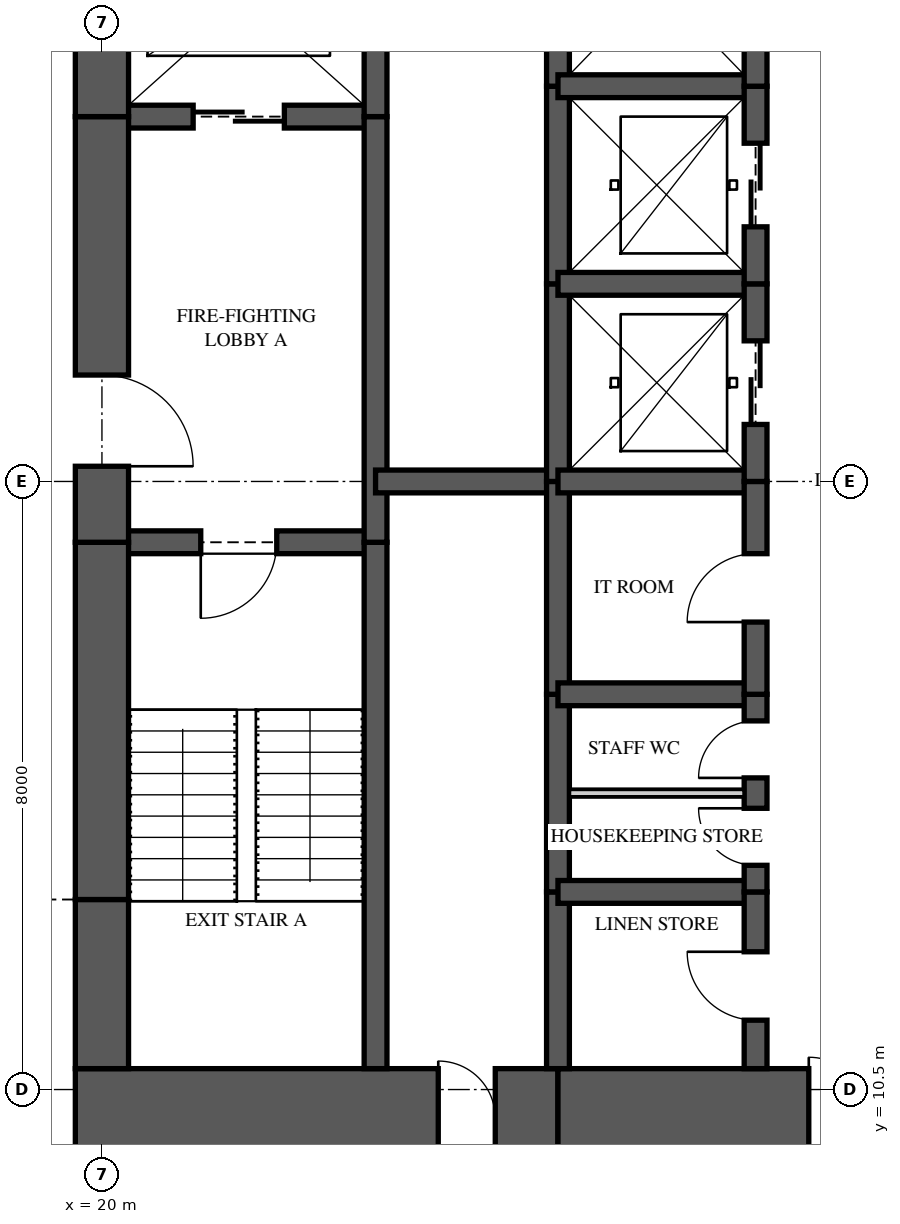
"""IFC4 building model, lengths in metres.
Left out: names, types, materials, properties, quantities, classifications, styles, units other than length and angle.
Written with IfcOpenShell. Run it as: python <this file> out.ifc"""

import sys

from ifc_helpers import new_model, si_unit, direction, frame, frame_2d, origin, place, context, subcontext, project, spatial, rectangle, extrude, element, fill, save


model = new_model("IFC4")
c1 = context("Model", 3, precision=1e-05, world=origin(), true_north=direction((0.0, 1.0)))
c2 = subcontext(c1, "Body", "Model", "MODEL_VIEW")
j1 = project(units=[si_unit("LENGTHUNIT", "METRE"), si_unit("PLANEANGLEUNIT", "RADIAN")], contexts=[c1])
p1 = place(None, origin())
s1 = spatial("IfcSite", under=j1, at=p1, CompositionType="ELEMENT")
p2 = place(p1, origin())
s2 = spatial("IfcBuilding", under=s1, at=p2, CompositionType="ELEMENT")
p3 = place(p2, frame((0.0, 0.0, 161.05)))
s3 = spatial("IfcBuildingStorey", under=s2, at=p3, CompositionType="ELEMENT", Elevation=161.05)
p4 = place(p3, frame((19.65, 10.125, 0.0), z_axis=(0.0, 0.0, 1.0), x_axis=(1.0, 0.0, 0.0)))
e1 = element("IfcWall", 1, at=p4, inside=s3, PredefinedType="SHEAR", context=c2, shape_type="SweptSolid", body=[
    extrude(rectangle(XDim=6.35, YDim=1.3, at=frame_2d((3.175, 0.0))), origin(), (0.0, 0.0, 1.0), 3.35),
])
p5 = place(p4, frame((4.775, 0.0, 0.0)))
e2 = element("IfcOpeningElement", 2, at=p5, cuts=e1, PredefinedType="OPENING", context=c2, shape_type="SweptSolid", body=[
    extrude(rectangle(XDim=0.75, YDim=2.1, at=frame_2d((0.375, 1.05))), frame((0.0, 0.66, 0.0), z_axis=(0.0, -1.0, 0.0), x_axis=(1.0, 0.0, 0.0)), (0.0, 0.0, 1.0), 1.32),
])
p6 = place(p3, frame((26.0, 10.125, 0.0), z_axis=(0.0, 0.0, 1.0), x_axis=(1.0, 0.0, 0.0)))
e3 = element("IfcWall", 3, at=p6, inside=s3, PredefinedType="SHEAR", context=c2, shape_type="SweptSolid", body=[
    extrude(rectangle(XDim=5.6, YDim=1.3, at=frame_2d((2.8, 0.0))), origin(), (0.0, 0.0, 1.0), 3.35),
])
p7 = place(p6, frame((3.3, 0.0, 0.0)))
e4 = element("IfcOpeningElement", 4, at=p7, cuts=e3, PredefinedType="OPENING", context=c2, shape_type="SweptSolid", body=[
    extrude(rectangle(XDim=1.6, YDim=2.1, at=frame_2d((0.8, 1.05))), frame((0.0, 0.66, 0.0), z_axis=(0.0, -1.0, 0.0), x_axis=(1.0, 0.0, 0.0)), (0.0, 0.0, 1.0), 1.32),
])
p8 = place(p3, frame((20.0, 26.225, 0.0), z_axis=(0.0, 0.0, 1.0), x_axis=(0.0, -1.0, 0.0)))
e5 = element("IfcWall", 5, at=p8, inside=s3, PredefinedType="SHEAR", context=c2, shape_type="SweptSolid", body=[
    extrude(rectangle(XDim=2.925, YDim=0.7, at=frame_2d((1.462, 0.0))), origin(), (0.0, 0.0, 1.0), 3.35),
])
p9 = place(p3, frame((20.0, 23.3, 0.0), z_axis=(0.0, 0.0, 1.0), x_axis=(0.0, -1.0, 0.0)))
e6 = element("IfcWall", 6, at=p9, inside=s3, PredefinedType="SHEAR", context=c2, shape_type="SweptSolid", body=[
    extrude(rectangle(XDim=5.6, YDim=0.7, at=frame_2d((2.8, 0.0))), origin(), (0.0, 0.0, 1.0), 3.35),
])
p10 = place(p9, frame((3.4, 0.0, 0.0)))
e7 = element("IfcOpeningElement", 7, at=p10, cuts=e6, PredefinedType="OPENING", context=c2, shape_type="SweptSolid", body=[
    extrude(rectangle(XDim=1.2, YDim=2.2, at=frame_2d((0.6, 1.1))), frame((0.0, 0.36, 0.0), z_axis=(0.0, -1.0, 0.0), x_axis=(1.0, 0.0, 0.0)), (0.0, 0.0, 1.0), 0.72),
])
p11 = place(p3, frame((20.0, 17.7, 0.0), z_axis=(0.0, 0.0, 1.0), x_axis=(0.0, -1.0, 0.0)))
e8 = element("IfcWall", 8, at=p11, inside=s3, PredefinedType="SHEAR", context=c2, shape_type="SweptSolid", body=[
    extrude(rectangle(XDim=4.7, YDim=0.7, at=frame_2d((2.35, 0.0))), origin(), (0.0, 0.0, 1.0), 3.35),
])
p12 = place(p3, frame((20.0, 13.0, 0.0), z_axis=(0.0, 0.0, 1.0), x_axis=(0.0, -1.0, 0.0)))
e9 = element("IfcWall", 9, at=p12, inside=s3, PredefinedType="SHEAR", context=c2, shape_type="SweptSolid", body=[
    extrude(rectangle(XDim=2.225, YDim=0.7, at=frame_2d((1.113, 0.0))), origin(), (0.0, 0.0, 1.0), 3.35),
])
p13 = place(p3, frame((23.6, 10.775, 0.0), z_axis=(0.0, 0.0, 1.0), x_axis=(0.0, 1.0, 0.0)))
e10 = element("IfcWall", 10, at=p13, inside=s3, PredefinedType="SHEAR", context=c2, shape_type="SweptSolid", body=[
    extrude(rectangle(XDim=6.925, YDim=0.3, at=frame_2d((3.462, 0.0))), origin(), (0.0, 0.0, 1.0), 3.35),
])
p14 = place(p3, frame((23.6, 17.7, 0.0), z_axis=(0.0, 0.0, 1.0), x_axis=(0.0, 1.0, 0.0)))
e11 = element("IfcWall", 11, at=p14, inside=s3, PredefinedType="SHEAR", context=c2, shape_type="SweptSolid", body=[
    extrude(rectangle(XDim=5.6, YDim=0.3, at=frame_2d((2.8, 0.0))), origin(), (0.0, 0.0, 1.0), 3.35),
])
p15 = place(p3, frame((23.6, 23.3, 0.0), z_axis=(0.0, 0.0, 1.0), x_axis=(0.0, 1.0, 0.0)))
e12 = element("IfcWall", 12, at=p15, inside=s3, PredefinedType="SHEAR", context=c2, shape_type="SweptSolid", body=[
    extrude(rectangle(XDim=2.925, YDim=0.3, at=frame_2d((1.462, 0.0))), origin(), (0.0, 0.0, 1.0), 3.35),
])
p16 = place(p3, frame((26.0, 10.775, 0.0), z_axis=(0.0, 0.0, 1.0), x_axis=(0.0, 1.0, 0.0)))
e13 = element("IfcWall", 13, at=p16, inside=s3, PredefinedType="SHEAR", context=c2, shape_type="SweptSolid", body=[
    extrude(rectangle(XDim=2.325, YDim=0.3, at=frame_2d((1.163, 0.0))), origin(), (0.0, 0.0, 1.0), 3.35),
])
p17 = place(p3, frame((26.0, 13.1, 0.0), z_axis=(0.0, 0.0, 1.0), x_axis=(0.0, 1.0, 0.0)))
e14 = element("IfcWall", 14, at=p17, inside=s3, PredefinedType="SHEAR", context=c2, shape_type="SweptSolid", body=[
    extrude(rectangle(XDim=2.6, YDim=0.3, at=frame_2d((1.3, 0.0))), origin(), (0.0, 0.0, 1.0), 3.35),
])
p18 = place(p3, frame((26.0, 15.7, 0.0), z_axis=(0.0, 0.0, 1.0), x_axis=(0.0, 1.0, 0.0)))
e15 = element("IfcWall", 15, at=p18, inside=s3, PredefinedType="SHEAR", context=c2, shape_type="SweptSolid", body=[
    extrude(rectangle(XDim=2.8, YDim=0.3, at=frame_2d((1.4, 0.0))), origin(), (0.0, 0.0, 1.0), 3.35),
])
p19 = place(p3, frame((26.0, 18.5, 0.0), z_axis=(0.0, 0.0, 1.0), x_axis=(0.0, 1.0, 0.0)))
e16 = element("IfcWall", 16, at=p19, inside=s3, PredefinedType="SHEAR", context=c2, shape_type="SweptSolid", body=[
    extrude(rectangle(XDim=2.6, YDim=0.3, at=frame_2d((1.3, 0.0))), origin(), (0.0, 0.0, 1.0), 3.35),
])
p20 = place(p3, frame((26.0, 21.1, 0.0), z_axis=(0.0, 0.0, 1.0), x_axis=(0.0, 1.0, 0.0)))
e17 = element("IfcWall", 17, at=p20, inside=s3, PredefinedType="SHEAR", context=c2, shape_type="SweptSolid", body=[
    extrude(rectangle(XDim=2.6, YDim=0.3, at=frame_2d((1.3, 0.0))), origin(), (0.0, 0.0, 1.0), 3.35),
])
p21 = place(p3, frame((26.0, 23.7, 0.0), z_axis=(0.0, 0.0, 1.0), x_axis=(0.0, 1.0, 0.0)))
e18 = element("IfcWall", 18, at=p21, inside=s3, PredefinedType="SHEAR", context=c2, shape_type="SweptSolid", body=[
    extrude(rectangle(XDim=2.525, YDim=0.3, at=frame_2d((1.263, 0.0))), origin(), (0.0, 0.0, 1.0), 3.35),
])
p22 = place(p3, frame((28.6, 10.775, 0.0), z_axis=(0.0, 0.0, 1.0), x_axis=(0.0, 1.0, 0.0)))
e19 = element("IfcWall", 19, at=p22, inside=s3, PredefinedType="SHEAR", context=c2, shape_type="SweptSolid", body=[
    extrude(rectangle(XDim=2.325, YDim=0.3, at=frame_2d((1.163, 0.0))), origin(), (0.0, 0.0, 1.0), 3.35),
])
p23 = place(p22, frame((0.637, 0.0, 0.0)))
e20 = element("IfcOpeningElement", 20, at=p23, cuts=e19, PredefinedType="OPENING", context=c2, shape_type="SweptSolid", body=[
    extrude(rectangle(XDim=0.9, YDim=2.1, at=frame_2d((0.45, 1.05))), frame((0.0, 0.16, 0.0), z_axis=(0.0, -1.0, 0.0), x_axis=(1.0, 0.0, 0.0)), (0.0, 0.0, 1.0), 0.32),
])
p24 = place(p3, frame((28.6, 13.1, 0.0), z_axis=(0.0, 0.0, 1.0), x_axis=(0.0, 1.0, 0.0)))
e21 = element("IfcWall", 21, at=p24, inside=s3, PredefinedType="SHEAR", context=c2, shape_type="SweptSolid", body=[
    extrude(rectangle(XDim=2.6, YDim=0.3, at=frame_2d((1.3, 0.0))), origin(), (0.0, 0.0, 1.0), 3.35),
])
p25 = place(p24, frame((0.35, 0.0, 0.0)))
e22 = element("IfcOpeningElement", 22, at=p25, cuts=e21, PredefinedType="OPENING", context=c2, shape_type="SweptSolid", body=[
    extrude(rectangle(XDim=0.75, YDim=2.1, at=frame_2d((0.375, 1.05))), frame((0.0, 0.16, 0.0), z_axis=(0.0, -1.0, 0.0), x_axis=(1.0, 0.0, 0.0)), (0.0, 0.0, 1.0), 0.32),
])
p26 = place(p24, frame((1.5, 0.0, 0.0)))
e23 = element("IfcOpeningElement", 23, at=p26, cuts=e21, PredefinedType="OPENING", context=c2, shape_type="SweptSolid", body=[
    extrude(rectangle(XDim=0.75, YDim=2.1, at=frame_2d((0.375, 1.05))), frame((0.0, 0.16, 0.0), z_axis=(0.0, -1.0, 0.0), x_axis=(1.0, 0.0, 0.0)), (0.0, 0.0, 1.0), 0.32),
])
p27 = place(p3, frame((28.6, 15.7, 0.0), z_axis=(0.0, 0.0, 1.0), x_axis=(0.0, 1.0, 0.0)))
e24 = element("IfcWall", 24, at=p27, inside=s3, PredefinedType="SHEAR", context=c2, shape_type="SweptSolid", body=[
    extrude(rectangle(XDim=2.8, YDim=0.3, at=frame_2d((1.4, 0.0))), origin(), (0.0, 0.0, 1.0), 3.35),
])
p28 = place(p27, frame((0.95, 0.0, 0.0)))
e25 = element("IfcOpeningElement", 25, at=p28, cuts=e24, PredefinedType="OPENING", context=c2, shape_type="SweptSolid", body=[
    extrude(rectangle(XDim=0.9, YDim=2.1, at=frame_2d((0.45, 1.05))), frame((0.0, 0.16, 0.0), z_axis=(0.0, -1.0, 0.0), x_axis=(1.0, 0.0, 0.0)), (0.0, 0.0, 1.0), 0.32),
])
p29 = place(p3, frame((28.6, 18.5, 0.0), z_axis=(0.0, 0.0, 1.0), x_axis=(0.0, 1.0, 0.0)))
e26 = element("IfcWall", 26, at=p29, inside=s3, PredefinedType="SHEAR", context=c2, shape_type="SweptSolid", body=[
    extrude(rectangle(XDim=2.6, YDim=0.3, at=frame_2d((1.3, 0.0))), origin(), (0.0, 0.0, 1.0), 3.35),
])
p30 = place(p29, frame((0.75, 0.0, 0.0)))
e27 = element("IfcOpeningElement", 27, at=p30, cuts=e26, PredefinedType="OPENING", context=c2, shape_type="SweptSolid", body=[
    extrude(rectangle(XDim=1.1, YDim=2.1, at=frame_2d((0.55, 1.05))), frame((0.0, 0.16, 0.0), z_axis=(0.0, -1.0, 0.0), x_axis=(1.0, 0.0, 0.0)), (0.0, 0.0, 1.0), 0.32),
])
p31 = place(p3, frame((28.6, 21.1, 0.0), z_axis=(0.0, 0.0, 1.0), x_axis=(0.0, 1.0, 0.0)))
e28 = element("IfcWall", 28, at=p31, inside=s3, PredefinedType="SHEAR", context=c2, shape_type="SweptSolid", body=[
    extrude(rectangle(XDim=2.6, YDim=0.3, at=frame_2d((1.3, 0.0))), origin(), (0.0, 0.0, 1.0), 3.35),
])
p32 = place(p31, frame((0.75, 0.0, 0.0)))
e29 = element("IfcOpeningElement", 29, at=p32, cuts=e28, PredefinedType="OPENING", context=c2, shape_type="SweptSolid", body=[
    extrude(rectangle(XDim=1.1, YDim=2.1, at=frame_2d((0.55, 1.05))), frame((0.0, 0.16, 0.0), z_axis=(0.0, -1.0, 0.0), x_axis=(1.0, 0.0, 0.0)), (0.0, 0.0, 1.0), 0.32),
])
p33 = place(p3, frame((28.6, 23.7, 0.0), z_axis=(0.0, 0.0, 1.0), x_axis=(0.0, 1.0, 0.0)))
e30 = element("IfcWall", 30, at=p33, inside=s3, PredefinedType="SHEAR", context=c2, shape_type="SweptSolid", body=[
    extrude(rectangle(XDim=2.525, YDim=0.3, at=frame_2d((1.263, 0.0))), origin(), (0.0, 0.0, 1.0), 3.35),
])
p34 = place(p33, frame((0.85, 0.0, 0.0)))
e31 = element("IfcOpeningElement", 31, at=p34, cuts=e30, PredefinedType="OPENING", context=c2, shape_type="SweptSolid", body=[
    extrude(rectangle(XDim=1.1, YDim=2.1, at=frame_2d((0.55, 1.05))), frame((0.0, 0.16, 0.0), z_axis=(0.0, -1.0, 0.0), x_axis=(1.0, 0.0, 0.0)), (0.0, 0.0, 1.0), 0.32),
])
p35 = place(p3, frame((20.0, 17.7, 0.0), z_axis=(0.0, 0.0, 1.0), x_axis=(1.0, 0.0, 0.0)))
e32 = element("IfcWall", 32, at=p35, inside=s3, PredefinedType="SHEAR", context=c2, shape_type="SweptSolid", body=[
    extrude(rectangle(XDim=3.6, YDim=0.3, at=frame_2d((1.8, 0.0))), origin(), (0.0, 0.0, 1.0), 3.35),
])
p36 = place(p35, frame((1.3, 0.0, 0.0)))
e33 = element("IfcOpeningElement", 33, at=p36, cuts=e32, PredefinedType="OPENING", context=c2, shape_type="SweptSolid", body=[
    extrude(rectangle(XDim=1.0, YDim=2.1, at=frame_2d((0.5, 1.05))), frame((0.0, 0.16, 0.0), z_axis=(0.0, -1.0, 0.0), x_axis=(1.0, 0.0, 0.0)), (0.0, 0.0, 1.0), 0.32),
])
p37 = place(p3, frame((20.0, 23.3, 0.0), z_axis=(0.0, 0.0, 1.0), x_axis=(1.0, 0.0, 0.0)))
e34 = element("IfcWall", 34, at=p37, inside=s3, PredefinedType="SHEAR", context=c2, shape_type="SweptSolid", body=[
    extrude(rectangle(XDim=3.6, YDim=0.3, at=frame_2d((1.8, 0.0))), origin(), (0.0, 0.0, 1.0), 3.35),
])
p38 = place(p37, frame((1.2, 0.0, 0.0)))
e35 = element("IfcOpeningElement", 35, at=p38, cuts=e34, PredefinedType="OPENING", context=c2, shape_type="SweptSolid", body=[
    extrude(rectangle(XDim=1.2, YDim=2.1, at=frame_2d((0.6, 1.05))), frame((0.0, 0.16, 0.0), z_axis=(0.0, -1.0, 0.0), x_axis=(1.0, 0.0, 0.0)), (0.0, 0.0, 1.0), 0.32),
])
p39 = place(p3, frame((23.6, 18.5, 0.0), z_axis=(0.0, 0.0, 1.0), x_axis=(1.0, 0.0, 0.0)))
e36 = element("IfcWall", 36, at=p39, inside=s3, PredefinedType="SHEAR", context=c2, shape_type="SweptSolid", body=[
    extrude(rectangle(XDim=2.4, YDim=0.3, at=frame_2d((1.2, 0.0))), origin(), (0.0, 0.0, 1.0), 3.35),
])
for number, where, z_axis, x_axis in (
    (37, (26.0, 13.1, 0.0), (0.0, 0.0, 1.0), (1.0, 0.0, 0.0)),
    (38, (26.0, 15.7, 0.0), (0.0, 0.0, 1.0), (1.0, 0.0, 0.0)),
    (39, (26.0, 18.5, 0.0), (0.0, 0.0, 1.0), (1.0, 0.0, 0.0)),
    (40, (26.0, 21.1, 0.0), (0.0, 0.0, 1.0), (1.0, 0.0, 0.0)),
    (41, (26.0, 23.7, 0.0), (0.0, 0.0, 1.0), (1.0, 0.0, 0.0)),
):
    element("IfcWall", number, at=place(p3, frame(where, z_axis=z_axis, x_axis=x_axis)), inside=s3, PredefinedType="SHEAR", context=c2, shape_type="SweptSolid", body=[
        extrude(rectangle(XDim=2.6, YDim=0.3, at=frame_2d((1.3, 0.0))), origin(), (0.0, 0.0, 1.0), 3.35),
    ])
p40 = place(p3, frame((26.15, 14.4, 0.0), z_axis=(0.0, 0.0, 1.0), x_axis=(1.0, 0.0, 0.0)))
e42 = element("IfcWall", 42, at=p40, inside=s3, PredefinedType="PARTITIONING", context=c2, shape_type="SweptSolid", body=[
    extrude(rectangle(XDim=2.3, YDim=0.1, at=frame_2d((1.15, 0.0))), origin(), (0.0, 0.0, 1.0), 3.11),
])
p41 = place(p36, frame((1.0, 0.0, 0.0), z_axis=(0.0, 0.0, 1.0), x_axis=(-1.0, 0.0, 0.0)))
e43 = element("IfcDoor", 43, at=p41, inside=s3, OperationType="SINGLE_SWING_RIGHT", PredefinedType="DOOR", context=c2, shape_type="SweptSolid", body=[
    extrude(rectangle(XDim=1.0, YDim=2.1, at=frame_2d((0.5, 1.05))), frame((0.0, 0.025, 0.0), z_axis=(0.0, -1.0, 0.0), x_axis=(1.0, 0.0, 0.0)), (0.0, 0.0, 1.0), 0.05),
])
fill(e33, e43)
p42 = place(p10, origin())
e44 = element("IfcDoor", 44, at=p42, inside=s3, OperationType="SINGLE_SWING_RIGHT", PredefinedType="DOOR", context=c2, shape_type="SweptSolid", body=[
    extrude(rectangle(XDim=1.2, YDim=2.2, at=frame_2d((0.6, 1.1))), frame((0.0, 0.025, 0.0), z_axis=(0.0, -1.0, 0.0), x_axis=(1.0, 0.0, 0.0)), (0.0, 0.0, 1.0), 0.05),
])
fill(e7, e44)
p43 = place(p38, origin())
e45 = element("IfcDoor", 45, at=p43, inside=s3, OperationType="SLIDING_TO_LEFT", PredefinedType="DOOR", context=c2, shape_type="SweptSolid", body=[
    extrude(rectangle(XDim=1.2, YDim=2.1, at=frame_2d((0.6, 1.05))), frame((0.0, 0.025, 0.0), z_axis=(0.0, -1.0, 0.0), x_axis=(1.0, 0.0, 0.0)), (0.0, 0.0, 1.0), 0.05),
])
fill(e35, e45)
p44 = place(p30, origin())
e46 = element("IfcDoor", 46, at=p44, inside=s3, OperationType="SLIDING_TO_LEFT", PredefinedType="DOOR", context=c2, shape_type="SweptSolid", body=[
    extrude(rectangle(XDim=1.1, YDim=2.1, at=frame_2d((0.55, 1.05))), frame((0.0, 0.025, 0.0), z_axis=(0.0, -1.0, 0.0), x_axis=(1.0, 0.0, 0.0)), (0.0, 0.0, 1.0), 0.05),
])
fill(e27, e46)
p45 = place(p32, origin())
e47 = element("IfcDoor", 47, at=p45, inside=s3, OperationType="SLIDING_TO_LEFT", PredefinedType="DOOR", context=c2, shape_type="SweptSolid", body=[
    extrude(rectangle(XDim=1.1, YDim=2.1, at=frame_2d((0.55, 1.05))), frame((0.0, 0.025, 0.0), z_axis=(0.0, -1.0, 0.0), x_axis=(1.0, 0.0, 0.0)), (0.0, 0.0, 1.0), 0.05),
])
fill(e29, e47)
p46 = place(p23, origin())
e48 = element("IfcDoor", 48, at=p46, inside=s3, OperationType="SINGLE_SWING_RIGHT", PredefinedType="DOOR", context=c2, shape_type="SweptSolid", body=[
    extrude(rectangle(XDim=0.9, YDim=2.1, at=frame_2d((0.45, 1.05))), frame((0.0, 0.025, 0.0), z_axis=(0.0, -1.0, 0.0), x_axis=(1.0, 0.0, 0.0)), (0.0, 0.0, 1.0), 0.05),
])
fill(e20, e48)
p47 = place(p25, origin())
e49 = element("IfcDoor", 49, at=p47, inside=s3, OperationType="SINGLE_SWING_RIGHT", PredefinedType="DOOR", context=c2, shape_type="SweptSolid", body=[
    extrude(rectangle(XDim=0.75, YDim=2.1, at=frame_2d((0.375, 1.05))), frame((0.0, 0.025, 0.0), z_axis=(0.0, -1.0, 0.0), x_axis=(1.0, 0.0, 0.0)), (0.0, 0.0, 1.0), 0.05),
])
fill(e22, e49)
p48 = place(p26, origin())
e50 = element("IfcDoor", 50, at=p48, inside=s3, OperationType="SINGLE_SWING_LEFT", PredefinedType="DOOR", context=c2, shape_type="SweptSolid", body=[
    extrude(rectangle(XDim=0.75, YDim=2.1, at=frame_2d((0.375, 1.05))), frame((0.0, 0.025, 0.0), z_axis=(0.0, -1.0, 0.0), x_axis=(1.0, 0.0, 0.0)), (0.0, 0.0, 1.0), 0.05),
])
fill(e23, e50)
p49 = place(p28, origin())
e51 = element("IfcDoor", 51, at=p49, inside=s3, OperationType="SINGLE_SWING_LEFT", PredefinedType="DOOR", context=c2, shape_type="SweptSolid", body=[
    extrude(rectangle(XDim=0.9, YDim=2.1, at=frame_2d((0.45, 1.05))), frame((0.0, 0.025, 0.0), z_axis=(0.0, -1.0, 0.0), x_axis=(1.0, 0.0, 0.0)), (0.0, 0.0, 1.0), 0.05),
])
fill(e25, e51)
p50 = place(p7, origin())
e52 = element("IfcDoor", 52, at=p50, inside=s3, OperationType="DOUBLE_DOOR_SINGLE_SWING", PredefinedType="DOOR", context=c2, shape_type="SweptSolid", body=[
    extrude(rectangle(XDim=1.6, YDim=2.1, at=frame_2d((0.8, 1.05))), frame((0.0, 0.025, 0.0), z_axis=(0.0, -1.0, 0.0), x_axis=(1.0, 0.0, 0.0)), (0.0, 0.0, 1.0), 0.05),
])
fill(e4, e52)
p51 = place(p5, origin())
e53 = element("IfcDoor", 53, at=p51, inside=s3, OperationType="SINGLE_SWING_LEFT", PredefinedType="DOOR", context=c2, shape_type="SweptSolid", body=[
    extrude(rectangle(XDim=0.75, YDim=2.1, at=frame_2d((0.375, 1.05))), frame((0.0, 0.025, 0.0), z_axis=(0.0, -1.0, 0.0), x_axis=(1.0, 0.0, 0.0)), (0.0, 0.0, 1.0), 0.05),
])
fill(e2, e53)
save(model, sys.argv[1])
